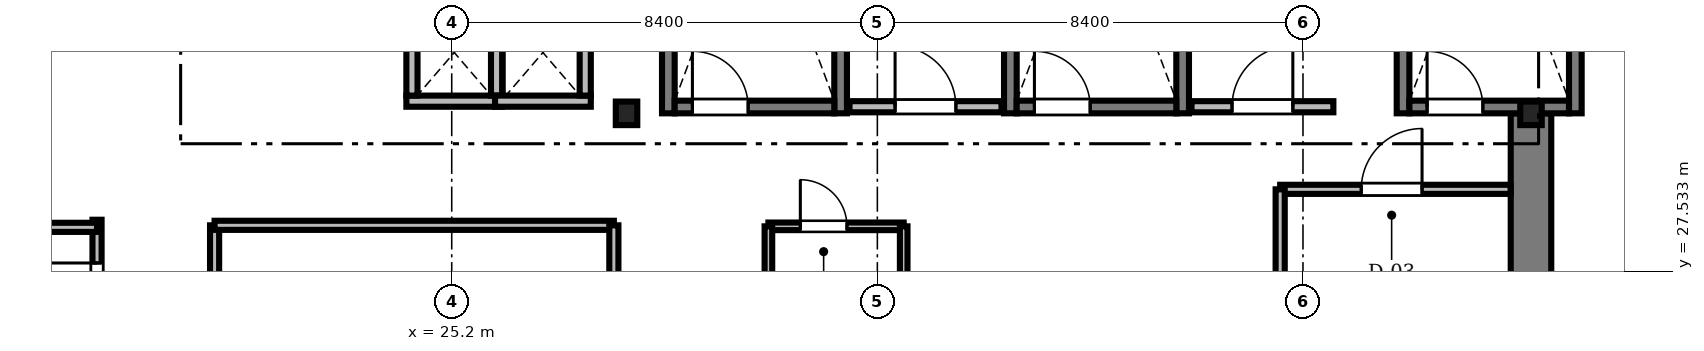
"""IFC4 building model, lengths in metres.
Left out: names, types, materials, properties, quantities, classifications, styles, units other than length and angle.
Written with IfcOpenShell. Run it as: python <this file> out.ifc"""

import sys

from ifc_helpers import new_model, si_unit, direction, frame, frame_2d, origin, origin_2d, place, context, subcontext, project, spatial, rectangle, i_section, extrude, source, transform, mapped, element, fill, save


model = new_model("IFC4")
c1 = context("Model", 3, precision=1e-05, world=origin(), true_north=direction((0.0, 1.0)))
c2 = subcontext(c1, "Body", "Model", "MODEL_VIEW")
j1 = project(units=[si_unit("LENGTHUNIT", "METRE"), si_unit("PLANEANGLEUNIT", "RADIAN")], contexts=[c1])
p1 = place(None, origin())
s1 = spatial("IfcSite", under=j1, at=p1, CompositionType="ELEMENT")
p2 = place(p1, origin())
s2 = spatial("IfcBuilding", under=s1, at=p2, CompositionType="ELEMENT")
p3 = place(p2, frame((0.0, 0.0, 133.5)))
s3 = spatial("IfcBuildingStorey", under=s2, at=p3, CompositionType="ELEMENT", Elevation=133.5)
m1 = source(origin(), c2, "Body", "SweptSolid", [
    extrude(rectangle(XDim=13.15, YDim=0.8, at=frame_2d((6.575, 0.0))), origin(), (0.0, 0.0, 1.0), 3.46),
])
p4 = place(p3, frame((46.5, 17.5, 0.0), z_axis=(0.0, 0.0, 1.0), x_axis=(0.0, 1.0, 0.0)))
e1 = element("IfcWall", 1, at=p4, inside=s3, PredefinedType="SHEAR", context=c2, shape_type="MappedRepresentation", body=[
    mapped(m1, transform((0.0, 0.0, 0.0), scale=1.0)),
])
m2 = source(origin(), c2, "Body", "SweptSolid", [
    extrude(i_section(OverallWidth=0.424, OverallDepth=0.465, WebThickness=0.035, FlangeThickness=0.056, FilletRadius=0.015, at=origin_2d()), origin(), (0.0, 0.0, 1.0), 3.46),
])
for number, where, z_axis, x_axis in (
    (2, (28.65, 30.65, 0.0), (0.0, 0.0, 1.0), (1.0, 0.0, 0.0)),
    (3, (46.5, 30.65, 0.0), (0.0, 0.0, 1.0), (1.0, 0.0, 0.0)),
):
    element("IfcColumn", number, at=place(p3, frame(where, z_axis=z_axis, x_axis=x_axis)), inside=s3, PredefinedType="COLUMN", context=c2, shape_type="MappedRepresentation", body=[
        mapped(m2, transform((0.0, 0.0, 0.0), scale=1.0)),
    ])
m3 = source(origin(), c2, "Body", "SweptSolid", [
    extrude(rectangle(XDim=9.25, YDim=0.25, at=frame_2d((4.625, 0.0))), origin(), (0.0, 0.0, 1.0), 3.5),
])
for number, where, z_axis, x_axis in (
    (4, (29.475, 30.65, 0.0), (0.0, 0.0, 1.0), (0.0, 1.0, 0.0)),
    (5, (32.875, 30.65, 0.0), (0.0, 0.0, 1.0), (0.0, 1.0, 0.0)),
):
    element("IfcWall", number, at=place(p3, frame(where, z_axis=z_axis, x_axis=x_axis)), inside=s3, PredefinedType="SOLIDWALL", context=c2, shape_type="MappedRepresentation", body=[
        mapped(m3, transform((0.0, 0.0, 0.0), scale=1.0)),
    ])
m4 = source(origin(), c2, "Body", "SweptSolid", [
    extrude(rectangle(XDim=3.15, YDim=0.25, at=frame_2d((1.575, 0.0))), origin(), (0.0, 0.0, 1.0), 3.5),
])
p5 = place(p3, frame((29.6, 30.775, 0.0), z_axis=(0.0, 0.0, 1.0), x_axis=(1.0, 0.0, 0.0)))
e6 = element("IfcWall", 6, at=p5, inside=s3, PredefinedType="SOLIDWALL", context=c2, shape_type="MappedRepresentation", body=[
    mapped(m4, transform((0.0, 0.0, 0.0), scale=1.0)),
])
m5 = source(origin(), c2, "Body", "SweptSolid", [
    extrude(rectangle(XDim=1.1, YDim=2.2, at=frame_2d((0.55, 1.1))), frame((0.0, 0.135, 0.0), z_axis=(0.0, -1.0, 0.0), x_axis=(1.0, 0.0, 0.0)), (0.0, 0.0, 1.0), 0.27),
])
p6 = place(p5, frame((0.35, 0.0, 0.0)))
e7 = element("IfcOpeningElement", 7, at=p6, cuts=e6, PredefinedType="OPENING", context=c2, shape_type="MappedRepresentation", body=[
    mapped(m5, transform((0.0, 0.0, 0.0), scale=1.0)),
])
for number, where, z_axis, x_axis in (
    (8, (36.225, 30.65, 0.0), (0.0, 0.0, 1.0), (0.0, 1.0, 0.0)),
    (9, (39.625, 30.65, 0.0), (0.0, 0.0, 1.0), (0.0, 1.0, 0.0)),
):
    element("IfcWall", number, at=place(p3, frame(where, z_axis=z_axis, x_axis=x_axis)), inside=s3, PredefinedType="SOLIDWALL", context=c2, shape_type="MappedRepresentation", body=[
        mapped(m3, transform((0.0, 0.0, 0.0), scale=1.0)),
    ])
p7 = place(p3, frame((36.35, 30.775, 0.0), z_axis=(0.0, 0.0, 1.0), x_axis=(1.0, 0.0, 0.0)))
e10 = element("IfcWall", 10, at=p7, inside=s3, PredefinedType="SOLIDWALL", context=c2, shape_type="MappedRepresentation", body=[
    mapped(m4, transform((0.0, 0.0, 0.0), scale=1.0)),
])
p8 = place(p7, frame((0.35, 0.0, 0.0)))
e11 = element("IfcOpeningElement", 11, at=p8, cuts=e10, PredefinedType="OPENING", context=c2, shape_type="MappedRepresentation", body=[
    mapped(m5, transform((0.0, 0.0, 0.0), scale=1.0)),
])
for number, where, z_axis, x_axis in (
    (12, (43.975, 30.65, 0.0), (0.0, 0.0, 1.0), (0.0, 1.0, 0.0)),
    (13, (47.375, 30.65, 0.0), (0.0, 0.0, 1.0), (0.0, 1.0, 0.0)),
):
    element("IfcWall", number, at=place(p3, frame(where, z_axis=z_axis, x_axis=x_axis)), inside=s3, PredefinedType="SOLIDWALL", context=c2, shape_type="MappedRepresentation", body=[
        mapped(m3, transform((0.0, 0.0, 0.0), scale=1.0)),
    ])
p9 = place(p3, frame((44.1, 30.775, 0.0), z_axis=(0.0, 0.0, 1.0), x_axis=(1.0, 0.0, 0.0)))
e14 = element("IfcWall", 14, at=p9, inside=s3, PredefinedType="SOLIDWALL", context=c2, shape_type="MappedRepresentation", body=[
    mapped(m4, transform((0.0, 0.0, 0.0), scale=1.0)),
])
p10 = place(p9, frame((0.35, 0.0, 0.0)))
e15 = element("IfcOpeningElement", 15, at=p10, cuts=e14, PredefinedType="OPENING", context=c2, shape_type="MappedRepresentation", body=[
    mapped(m5, transform((0.0, 0.0, 0.0), scale=1.0)),
])
m6 = source(origin(), c2, "Body", "SweptSolid", [
    extrude(rectangle(XDim=3.0, YDim=0.22, at=frame_2d((1.5, 0.0))), origin(), (0.0, 0.0, 1.0), 3.46),
])
p11 = place(p3, frame((33.05, 30.78, 0.0), z_axis=(0.0, 0.0, 1.0), x_axis=(1.0, 0.0, 0.0)))
e16 = element("IfcWall", 16, at=p11, inside=s3, PredefinedType="SOLIDWALL", context=c2, shape_type="MappedRepresentation", body=[
    mapped(m6, transform((0.0, 0.0, 0.0), scale=1.0)),
])
m7 = source(origin(), c2, "Body", "SweptSolid", [
    extrude(rectangle(XDim=1.2, YDim=2.2, at=frame_2d((0.6, 1.1))), frame((0.0, 0.12, 0.0), z_axis=(0.0, -1.0, 0.0), x_axis=(1.0, 0.0, 0.0)), (0.0, 0.0, 1.0), 0.24),
])
p12 = place(p11, frame((0.9, 0.0, 0.0)))
e17 = element("IfcOpeningElement", 17, at=p12, cuts=e16, PredefinedType="OPENING", context=c2, shape_type="MappedRepresentation", body=[
    mapped(m7, transform((0.0, 0.0, 0.0), scale=1.0)),
])
m8 = source(origin(), c2, "Body", "SweptSolid", [
    extrude(rectangle(XDim=2.8, YDim=0.22, at=frame_2d((1.4, 0.0))), origin(), (0.0, 0.0, 1.0), 3.46),
])
p13 = place(p3, frame((39.8, 30.78, 0.0), z_axis=(0.0, 0.0, 1.0), x_axis=(1.0, 0.0, 0.0)))
e18 = element("IfcWall", 18, at=p13, inside=s3, PredefinedType="SOLIDWALL", context=c2, shape_type="MappedRepresentation", body=[
    mapped(m8, transform((0.0, 0.0, 0.0), scale=1.0)),
])
p14 = place(p13, frame((0.8, 0.0, 0.0)))
e19 = element("IfcOpeningElement", 19, at=p14, cuts=e18, PredefinedType="OPENING", context=c2, shape_type="MappedRepresentation", body=[
    mapped(m7, transform((0.0, 0.0, 0.0), scale=1.0)),
])
m9 = source(origin(), c2, "Body", "SweptSolid", [
    extrude(rectangle(XDim=1.89, YDim=0.22, at=frame_2d((0.945, 0.0))), origin(), (0.0, 0.0, 1.0), 3.46),
])
p15 = place(p3, frame((24.305, 30.89, 0.0), z_axis=(0.0, 0.0, 1.0), x_axis=(1.0, 0.0, 0.0)))
e20 = element("IfcWall", 20, at=p15, inside=s3, PredefinedType="SOLIDWALL", context=c2, shape_type="MappedRepresentation", body=[
    mapped(m9, transform((0.0, 0.0, 0.0), scale=1.0)),
])
m10 = source(origin(), c2, "Body", "SweptSolid", [
    extrude(rectangle(XDim=1.7, YDim=0.22, at=frame_2d((0.85, 0.0))), origin(), (0.0, 0.0, 1.0), 3.46),
])
for number, where, z_axis, x_axis in (
    (21, (24.415, 31.0, 0.0), (0.0, 0.0, 1.0), (0.0, 1.0, 0.0)),
    (22, (26.085, 31.0, 0.0), (0.0, 0.0, 1.0), (0.0, 1.0, 0.0)),
):
    element("IfcWall", number, at=place(p3, frame(where, z_axis=z_axis, x_axis=x_axis)), inside=s3, PredefinedType="SOLIDWALL", context=c2, shape_type="MappedRepresentation", body=[
        mapped(m10, transform((0.0, 0.0, 0.0), scale=1.0)),
    ])
p16 = place(p3, frame((26.055, 30.89, 0.0), z_axis=(0.0, 0.0, 1.0), x_axis=(1.0, 0.0, 0.0)))
e23 = element("IfcWall", 23, at=p16, inside=s3, PredefinedType="SOLIDWALL", context=c2, shape_type="MappedRepresentation", body=[
    mapped(m9, transform((0.0, 0.0, 0.0), scale=1.0)),
])
p17 = place(p3, frame((27.835, 31.0, 0.0), z_axis=(0.0, 0.0, 1.0), x_axis=(0.0, 1.0, 0.0)))
e24 = element("IfcWall", 24, at=p17, inside=s3, PredefinedType="SOLIDWALL", context=c2, shape_type="MappedRepresentation", body=[
    mapped(m10, transform((0.0, 0.0, 0.0), scale=1.0)),
])
m11 = source(origin(), c2, "Body", "SweptSolid", [
    extrude(rectangle(XDim=14.3, YDim=0.18, at=frame_2d((7.15, 0.0))), origin(), (0.0, 0.0, 1.0), 2.852),
])
p18 = place(p3, frame((18.2, 14.25, 0.0), z_axis=(0.0, 0.0, 1.0), x_axis=(0.0, 1.0, 0.0)))
e25 = element("IfcWall", 25, at=p18, inside=s3, PredefinedType="PARTITIONING", context=c2, shape_type="MappedRepresentation", body=[
    mapped(m11, transform((0.0, 0.0, 0.0), scale=1.0)),
])
m12 = source(origin(), c2, "Body", "SweptSolid", [
    extrude(rectangle(XDim=1.05, YDim=2.2, at=frame_2d((0.525, 1.1))), frame((0.0, 0.1, 0.0), z_axis=(0.0, -1.0, 0.0), x_axis=(1.0, 0.0, 0.0)), (0.0, 0.0, 1.0), 0.2),
])
p19 = place(p18, frame((1.838, 0.0, 0.0)))
e26 = element("IfcOpeningElement", 26, at=p19, cuts=e25, PredefinedType="OPENING", context=c2, shape_type="MappedRepresentation", body=[
    mapped(m12, transform((0.0, 0.0, 0.0), scale=1.0)),
])
m13 = source(origin(), c2, "Body", "SweptSolid", [
    extrude(rectangle(XDim=0.95, YDim=2.15, at=frame_2d((0.475, 1.075))), frame((0.0, 0.1, 0.0), z_axis=(0.0, -1.0, 0.0), x_axis=(1.0, 0.0, 0.0)), (0.0, 0.0, 1.0), 0.2),
])
p20 = place(p18, frame((7.78, 0.0, 0.0)))
e27 = element("IfcOpeningElement", 27, at=p20, cuts=e25, PredefinedType="OPENING", context=c2, shape_type="MappedRepresentation", body=[
    mapped(m13, transform((0.0, 0.0, 0.0), scale=1.0)),
])
p21 = place(p18, frame((12.497, 0.0, 0.0)))
e28 = element("IfcOpeningElement", 28, at=p21, cuts=e25, PredefinedType="OPENING", context=c2, shape_type="MappedRepresentation", body=[
    mapped(m13, transform((0.0, 0.0, 0.0), scale=1.0)),
])
m14 = source(origin(), c2, "Body", "SweptSolid", [
    extrude(rectangle(XDim=6.54, YDim=0.18, at=frame_2d((3.27, 0.0))), origin(), (0.0, 0.0, 1.0), 2.852),
])
p22 = place(p3, frame((20.52, 21.9, 0.0), z_axis=(0.0, 0.0, 1.0), x_axis=(0.0, 1.0, 0.0)))
e29 = element("IfcWall", 29, at=p22, inside=s3, PredefinedType="PARTITIONING", context=c2, shape_type="MappedRepresentation", body=[
    mapped(m14, transform((0.0, 0.0, 0.0), scale=1.0)),
])
p23 = place(p22, frame((2.2, 0.0, 0.0)))
e30 = element("IfcOpeningElement", 30, at=p23, cuts=e29, PredefinedType="OPENING", context=c2, shape_type="MappedRepresentation", body=[
    mapped(m12, transform((0.0, 0.0, 0.0), scale=1.0)),
])
m15 = source(origin(), c2, "Body", "SweptSolid", [
    extrude(rectangle(XDim=4.548, YDim=0.18, at=frame_2d((2.274, 0.0))), origin(), (0.0, 0.0, 1.0), 3.092),
])
p24 = place(p3, frame((41.55, 29.15, 0.0), z_axis=(0.0, 0.0, 1.0), x_axis=(1.0, 0.0, 0.0)))
e31 = element("IfcWall", 31, at=p24, inside=s3, PredefinedType="PARTITIONING", context=c2, shape_type="MappedRepresentation", body=[
    mapped(m15, transform((0.0, 0.0, 0.0), scale=1.0)),
])
m16 = source(origin(), c2, "Body", "SweptSolid", [
    extrude(rectangle(XDim=1.2, YDim=2.2, at=frame_2d((0.6, 1.1))), frame((0.0, 0.1, 0.0), z_axis=(0.0, -1.0, 0.0), x_axis=(1.0, 0.0, 0.0)), (0.0, 0.0, 1.0), 0.2),
])
p25 = place(p24, frame((1.6, 0.0, 0.0)))
e32 = element("IfcOpeningElement", 32, at=p25, cuts=e31, PredefinedType="OPENING", context=c2, shape_type="MappedRepresentation", body=[
    mapped(m16, transform((0.0, 0.0, 0.0), scale=1.0)),
])
m17 = source(origin(), c2, "Body", "SweptSolid", [
    extrude(rectangle(XDim=2.67, YDim=0.15, at=frame_2d((1.335, 0.0))), origin(), (0.0, 0.0, 1.0), 3.092),
])
p26 = place(p3, frame((31.45, 28.42, 0.0), z_axis=(0.0, 0.0, 1.0), x_axis=(1.0, 0.0, 0.0)))
e33 = element("IfcWall", 33, at=p26, inside=s3, PredefinedType="PARTITIONING", context=c2, shape_type="MappedRepresentation", body=[
    mapped(m17, transform((0.0, 0.0, 0.0), scale=1.0)),
])
m18 = source(origin(), c2, "Body", "SweptSolid", [
    extrude(rectangle(XDim=0.92, YDim=2.1, at=frame_2d((0.46, 1.05))), frame((0.0, 0.085, 0.0), z_axis=(0.0, -1.0, 0.0), x_axis=(1.0, 0.0, 0.0)), (0.0, 0.0, 1.0), 0.17),
])
p27 = place(p26, frame((0.63, 0.0, 0.0)))
e34 = element("IfcOpeningElement", 34, at=p27, cuts=e33, PredefinedType="OPENING", context=c2, shape_type="MappedRepresentation", body=[
    mapped(m18, transform((0.0, 0.0, 0.0), scale=1.0)),
])
m19 = source(origin(), c2, "Body", "SweptSolid", [
    extrude(rectangle(XDim=11.47, YDim=0.18, at=frame_2d((5.735, 0.0))), origin(), (0.0, 0.0, 1.0), 2.702),
])
p28 = place(p3, frame((6.73, 28.4, 0.0), z_axis=(0.0, 0.0, 1.0), x_axis=(1.0, 0.0, 0.0)))
e35 = element("IfcWall", 35, at=p28, inside=s3, PredefinedType="PARTITIONING", context=c2, shape_type="MappedRepresentation", body=[
    mapped(m19, transform((0.0, 0.0, 0.0), scale=1.0)),
])
m20 = source(origin(), c2, "Body", "SweptSolid", [
    extrude(rectangle(XDim=7.88, YDim=0.18, at=frame_2d((3.94, 0.0))), origin(), (0.0, 0.0, 1.0), 3.46),
])
p29 = place(p3, frame((20.52, 28.44, 0.0), z_axis=(0.0, 0.0, 1.0), x_axis=(1.0, 0.0, 0.0)))
e36 = element("IfcWall", 36, at=p29, inside=s3, PredefinedType="PARTITIONING", context=c2, shape_type="MappedRepresentation", body=[
    mapped(m20, transform((0.0, 0.0, 0.0), scale=1.0)),
])
p30 = place(p3, frame((28.4, 21.9, 0.0), z_axis=(0.0, 0.0, 1.0), x_axis=(0.0, 1.0, 0.0)))
e37 = element("IfcWall", 37, at=p30, inside=s3, PredefinedType="PARTITIONING", context=c2, shape_type="MappedRepresentation", body=[
    mapped(m14, transform((0.0, 0.0, 0.0), scale=1.0)),
])
m21 = source(origin(), c2, "Body", "SweptSolid", [
    extrude(rectangle(XDim=2.35, YDim=0.18, at=frame_2d((1.175, 0.0))), origin(), (0.0, 0.0, 1.0), 2.852),
])
p31 = place(p3, frame((41.55, 26.8, 0.0), z_axis=(0.0, 0.0, 1.0), x_axis=(0.0, 1.0, 0.0)))
e38 = element("IfcWall", 38, at=p31, inside=s3, PredefinedType="PARTITIONING", context=c2, shape_type="MappedRepresentation", body=[
    mapped(m21, transform((0.0, 0.0, 0.0), scale=1.0)),
])
m22 = source(origin(), c2, "Body", "SweptSolid", [
    extrude(rectangle(XDim=1.6, YDim=0.15, at=frame_2d((0.8, 0.0))), origin(), (0.0, 0.0, 1.0), 3.002),
])
for number, where, z_axis, x_axis in (
    (39, (31.45, 26.82, 0.0), (0.0, 0.0, 1.0), (0.0, 1.0, 0.0)),
    (40, (34.12, 26.82, 0.0), (0.0, 0.0, 1.0), (0.0, 1.0, 0.0)),
):
    element("IfcWall", number, at=place(p3, frame(where, z_axis=z_axis, x_axis=x_axis)), inside=s3, PredefinedType="PARTITIONING", context=c2, shape_type="MappedRepresentation", body=[
        mapped(m22, transform((0.0, 0.0, 0.0), scale=1.0)),
    ])
m23 = source(origin(), c2, "Body", "SweptSolid", [
    extrude(rectangle(XDim=1.1, YDim=2.2, at=frame_2d((0.55, 1.1))), frame((0.0, 0.025, 0.0), z_axis=(0.0, -1.0, 0.0), x_axis=(1.0, 0.0, 0.0)), (0.0, 0.0, 1.0), 0.05),
])
p32 = place(p6, origin())
e41 = element("IfcDoor", 41, at=p32, inside=s3, OperationType="SINGLE_SWING_LEFT", PredefinedType="DOOR", context=c2, shape_type="MappedRepresentation", body=[
    mapped(m23, transform((0.0, 0.0, 0.0), scale=1.0)),
])
fill(e7, e41)
p33 = place(p8, origin())
e42 = element("IfcDoor", 42, at=p33, inside=s3, OperationType="SINGLE_SWING_LEFT", PredefinedType="DOOR", context=c2, shape_type="MappedRepresentation", body=[
    mapped(m23, transform((0.0, 0.0, 0.0), scale=1.0)),
])
fill(e11, e42)
p34 = place(p10, origin())
e43 = element("IfcDoor", 43, at=p34, inside=s3, OperationType="SINGLE_SWING_LEFT", PredefinedType="DOOR", context=c2, shape_type="MappedRepresentation", body=[
    mapped(m23, transform((0.0, 0.0, 0.0), scale=1.0)),
])
fill(e15, e43)
m24 = source(origin(), c2, "Body", "SweptSolid", [
    extrude(rectangle(XDim=1.2, YDim=2.2, at=frame_2d((0.6, 1.1))), frame((0.0, 0.025, 0.0), z_axis=(0.0, -1.0, 0.0), x_axis=(1.0, 0.0, 0.0)), (0.0, 0.0, 1.0), 0.05),
])
p35 = place(p12, origin())
e44 = element("IfcDoor", 44, at=p35, inside=s3, OperationType="SINGLE_SWING_LEFT", PredefinedType="DOOR", context=c2, shape_type="MappedRepresentation", body=[
    mapped(m24, transform((0.0, 0.0, 0.0), scale=1.0)),
])
fill(e17, e44)
p36 = place(p14, origin())
e45 = element("IfcDoor", 45, at=p36, inside=s3, OperationType="SINGLE_SWING_RIGHT", PredefinedType="DOOR", context=c2, shape_type="MappedRepresentation", body=[
    mapped(m24, transform((0.0, 0.0, 0.0), scale=1.0)),
])
fill(e19, e45)
m25 = source(origin(), c2, "Body", "SweptSolid", [
    extrude(rectangle(XDim=0.95, YDim=2.15, at=frame_2d((0.475, 1.075))), frame((0.0, 0.025, 0.0), z_axis=(0.0, -1.0, 0.0), x_axis=(1.0, 0.0, 0.0)), (0.0, 0.0, 1.0), 0.05),
])
p37 = place(p21, origin())
e46 = element("IfcDoor", 46, at=p37, inside=s3, OperationType="SINGLE_SWING_RIGHT", PredefinedType="DOOR", context=c2, shape_type="MappedRepresentation", body=[
    mapped(m25, transform((0.0, 0.0, 0.0), scale=1.0)),
])
fill(e28, e46)
p38 = place(p25, origin())
e47 = element("IfcDoor", 47, at=p38, inside=s3, OperationType="SINGLE_SWING_RIGHT", PredefinedType="DOOR", context=c2, shape_type="MappedRepresentation", body=[
    mapped(m24, transform((0.0, 0.0, 0.0), scale=1.0)),
])
fill(e32, e47)
m26 = source(origin(), c2, "Body", "SweptSolid", [
    extrude(rectangle(XDim=0.92, YDim=2.1, at=frame_2d((0.46, 1.05))), frame((0.0, 0.025, 0.0), z_axis=(0.0, -1.0, 0.0), x_axis=(1.0, 0.0, 0.0)), (0.0, 0.0, 1.0), 0.05),
])
p39 = place(p27, origin())
e48 = element("IfcDoor", 48, at=p39, inside=s3, OperationType="SINGLE_SWING_LEFT", PredefinedType="DOOR", context=c2, shape_type="MappedRepresentation", body=[
    mapped(m26, transform((0.0, 0.0, 0.0), scale=1.0)),
])
fill(e34, e48)
save(model, sys.argv[1])
